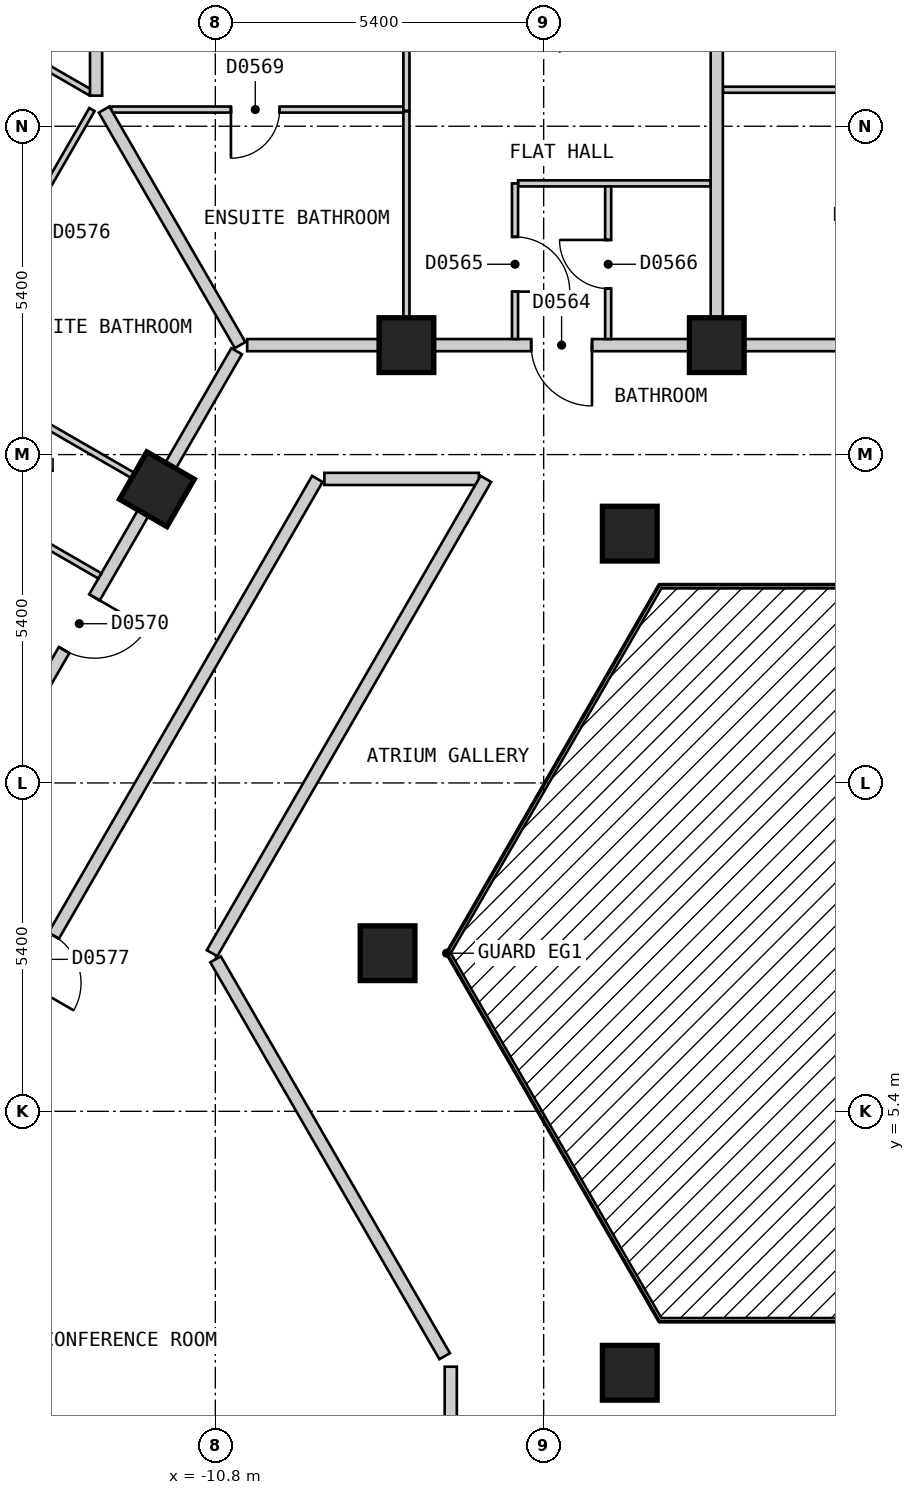
"""IFC4 building model, lengths in metres.
Left out: names, types, materials, properties, quantities, classifications, styles, units other than length and angle.
Written with IfcOpenShell. Run it as: python <this file> out.ifc"""

import sys

from ifc_helpers import new_model, si_unit, direction, frame, frame_2d, origin, origin_2d, place, context, subcontext, project, spatial, rectangle, extrude, element, fill, save


model = new_model("IFC4")
c1 = context("Model", 3, precision=1e-05, world=origin(), true_north=direction((0.0, 1.0)))
c2 = subcontext(c1, "Body", "Model", "MODEL_VIEW")
j1 = project(units=[si_unit("LENGTHUNIT", "METRE"), si_unit("PLANEANGLEUNIT", "RADIAN")], contexts=[c1])
p1 = place(None, origin())
s1 = spatial("IfcSite", under=j1, at=p1, CompositionType="ELEMENT")
p2 = place(p1, origin())
s2 = spatial("IfcBuilding", under=s1, at=p2, CompositionType="ELEMENT")
p3 = place(p2, frame((0.0, 0.0, 44.4)))
s3 = spatial("IfcBuildingStorey", under=s2, at=p3, CompositionType="ELEMENT", Elevation=44.4)
for number, where, z_axis, x_axis in (
    (1, (-2.553, 18.0, 0.0), (0.0, 0.0, 1.0), (-1.0, 0.0, 0.0)),
    (2, (-3.984, 14.9, 0.0), (0.0, 0.0, 1.0), (1.0, 0.0, 0.0)),
    (3, (-7.657, 18.0, 0.0), (0.0, 0.0, 1.0), (-1.0, 0.0, 0.0)),
    (4, (-11.761, 15.63, 0.0), (0.0, 0.0, 1.0), (-0.5, -0.866, 0.0)),
    (5, (-7.967, 8.0, 0.0), (0.0, 0.0, 1.0), (1.0, 0.0, 0.0)),
    (6, (-3.984, 1.1, 0.0), (0.0, 0.0, 1.0), (1.0, 0.0, 0.0)),
):
    element("IfcColumn", number, at=place(p3, frame(where, z_axis=z_axis, x_axis=x_axis)), inside=s3, PredefinedType="COLUMN", context=c2, shape_type="SweptSolid", body=[
        extrude(rectangle(XDim=0.9, YDim=0.9, at=origin_2d()), origin(), (0.0, 0.0, 1.0), 3.0),
    ])
p4 = place(p3, frame((-10.796, 7.9, 0.0), z_axis=(0.0, 0.0, 1.0), x_axis=(0.499954271211, -0.866051803703, 0.0)))
e7 = element("IfcWall", 7, at=p4, inside=s3, PredefinedType="PARTITIONING", context=c2, shape_type="SweptSolid", body=[
    extrude(rectangle(XDim=7.536, YDim=0.2, at=frame_2d((3.768, 0.0))), origin(), (0.0, 0.0, 1.0), 2.7),
])
p5 = place(p3, frame((-9.006, 15.8, 0.0), z_axis=(0.0, 0.0, 1.0), x_axis=(1.0, 0.0, 0.0)))
e8 = element("IfcWall", 8, at=p5, inside=s3, PredefinedType="PARTITIONING", context=c2, shape_type="SweptSolid", body=[
    extrude(rectangle(XDim=2.54, YDim=0.2, at=frame_2d((1.27, 0.0))), origin(), (0.0, 0.0, 1.0), 2.7),
])
p6 = place(p3, frame((-10.276, 18.0, 0.0), z_axis=(0.0, 0.0, 1.0), x_axis=(1.0, 0.0, 0.0)))
e9 = element("IfcWall", 9, at=p6, inside=s3, PredefinedType="PARTITIONING", context=c2, shape_type="SweptSolid", body=[
    extrude(rectangle(XDim=20.553, YDim=0.2, at=frame_2d((10.276, 0.0))), origin(), (0.0, 0.0, 1.0), 2.7),
])
p7 = place(p6, frame((14.879, 0.0, 0.0)))
e10 = element("IfcOpeningElement", 10, at=p7, cuts=e9, PredefinedType="OPENING", context=c2, shape_type="SweptSolid", body=[
    extrude(rectangle(XDim=1.0, YDim=2.1, at=frame_2d((0.5, 1.05))), frame((0.0, 0.11, 0.0), z_axis=(0.0, -1.0, 0.0), x_axis=(1.0, 0.0, 0.0)), (0.0, 0.0, 1.0), 0.22),
])
p8 = place(p6, frame((4.671, 0.0, 0.0)))
e11 = element("IfcOpeningElement", 11, at=p8, cuts=e9, PredefinedType="OPENING", context=c2, shape_type="SweptSolid", body=[
    extrude(rectangle(XDim=1.0, YDim=2.1, at=frame_2d((0.5, 1.05))), frame((0.0, 0.11, 0.0), z_axis=(0.0, -1.0, 0.0), x_axis=(1.0, 0.0, 0.0)), (0.0, 0.0, 1.0), 0.22),
])
p9 = place(p3, frame((-10.854, 8.0, 0.0), z_axis=(0.0, 0.0, 1.0), x_axis=(0.499964141897, 0.86604610548, 0.0)))
e12 = element("IfcWall", 12, at=p9, inside=s3, PredefinedType="PARTITIONING", context=c2, shape_type="SweptSolid", body=[
    extrude(rectangle(XDim=9.007, YDim=0.2, at=frame_2d((4.503, 0.0))), origin(), (0.0, 0.0, 1.0), 2.7),
])
p10 = place(p3, frame((-18.244, -0.001, 0.0), z_axis=(0.0, 0.0, 1.0), x_axis=(0.499962999376, 0.866046765051, 0.0)))
e13 = element("IfcWall", 13, at=p10, inside=s3, PredefinedType="PARTITIONING", context=c2, shape_type="SweptSolid", body=[
    extrude(rectangle(XDim=18.245, YDim=0.2, at=frame_2d((9.123, 0.0))), origin(), (0.0, 0.0, 1.0), 2.7),
])
p11 = place(p10, frame((8.672, 0.0, 0.0)))
e14 = element("IfcOpeningElement", 14, at=p11, cuts=e13, PredefinedType="OPENING", context=c2, shape_type="SweptSolid", body=[
    extrude(rectangle(XDim=0.9, YDim=2.1, at=frame_2d((0.45, 1.05))), frame((0.0, 0.11, 0.0), z_axis=(0.0, -1.0, 0.0), x_axis=(1.0, 0.0, 0.0)), (0.0, 0.0, 1.0), 0.22),
])
p12 = place(p3, frame((-20.727, 0.099, 0.0), z_axis=(0.0, 0.0, 1.0), x_axis=(0.499993204491, 0.866029327138, 0.0)))
e15 = element("IfcWall", 15, at=p12, inside=s3, PredefinedType="PARTITIONING", context=c2, shape_type="SweptSolid", body=[
    extrude(rectangle(XDim=20.554, YDim=0.2, at=frame_2d((10.277, 0.0))), origin(), (0.0, 0.0, 1.0), 2.7),
])
p13 = place(p12, frame((9.776, 0.0, 0.0)))
e16 = element("IfcOpeningElement", 16, at=p13, cuts=e15, PredefinedType="OPENING", context=c2, shape_type="SweptSolid", body=[
    extrude(rectangle(XDim=1.0, YDim=2.1, at=frame_2d((0.5, 1.05))), frame((0.0, 0.11, 0.0), z_axis=(0.0, -1.0, 0.0), x_axis=(1.0, 0.0, 0.0)), (0.0, 0.0, 1.0), 0.22),
])
p14 = place(p12, frame((4.673, 0.0, 0.0)))
e17 = element("IfcOpeningElement", 17, at=p14, cuts=e15, PredefinedType="OPENING", context=c2, shape_type="SweptSolid", body=[
    extrude(rectangle(XDim=1.0, YDim=2.1, at=frame_2d((0.5, 1.05))), frame((0.0, 0.11, 0.0), z_axis=(0.0, -1.0, 0.0), x_axis=(1.0, 0.0, 0.0)), (0.0, 0.0, 1.0), 0.22),
])
p15 = place(p12, frame((14.88, 0.0, 0.0)))
e18 = element("IfcOpeningElement", 18, at=p15, cuts=e15, PredefinedType="OPENING", context=c2, shape_type="SweptSolid", body=[
    extrude(rectangle(XDim=1.0, YDim=2.1, at=frame_2d((0.5, 1.05))), frame((0.0, 0.11, 0.0), z_axis=(0.0, -1.0, 0.0), x_axis=(1.0, 0.0, 0.0)), (0.0, 0.0, 1.0), 0.22),
])
p16 = place(p3, frame((-6.928, -2.8, 0.0), z_axis=(0.0, 0.0, 1.0), x_axis=(0.0, 1.0, 0.0)))
e19 = element("IfcWall", 19, at=p16, inside=s3, PredefinedType="PARTITIONING", context=c2, shape_type="SweptSolid", body=[
    extrude(rectangle(XDim=4.0, YDim=0.2, at=frame_2d((2.0, 0.0))), origin(), (0.0, 0.0, 1.0), 2.7),
])
p17 = place(p3, frame((-7.657, 21.844, 0.0), z_axis=(0.0, 0.0, 1.0), x_axis=(0.0, -1.0, 0.0)))
e20 = element("IfcWall", 20, at=p17, inside=s3, PredefinedType="PARTITIONING", context=c2, shape_type="SweptSolid", body=[
    extrude(rectangle(XDim=3.744, YDim=0.1, at=frame_2d((1.872, 0.0))), origin(), (0.0, 0.0, 1.0), 2.7),
])
p18 = place(p3, frame((-16.073, 16.154, 0.0), z_axis=(0.0, 0.0, 1.0), x_axis=(0.865979019114, -0.500080332001, 0.0)))
e21 = element("IfcWall", 21, at=p18, inside=s3, PredefinedType="PARTITIONING", context=c2, shape_type="SweptSolid", body=[
    extrude(rectangle(XDim=3.897, YDim=0.1, at=frame_2d((1.949, 0.0))), origin(), (0.0, 0.0, 1.0), 2.7),
])
p19 = place(p18, frame((1.524, 0.0, 0.0)))
e22 = element("IfcOpeningElement", 22, at=p19, cuts=e21, PredefinedType="OPENING", context=c2, shape_type="SweptSolid", body=[
    extrude(rectangle(XDim=0.9, YDim=2.1, at=frame_2d((0.45, 1.05))), frame((0.0, 0.06, 0.0), z_axis=(0.0, -1.0, 0.0), x_axis=(1.0, 0.0, 0.0)), (0.0, 0.0, 1.0), 0.12),
])
p20 = place(p3, frame((-20.508, 20.679, 0.0), z_axis=(0.0, 0.0, 1.0), x_axis=(0.866047370643, -0.499961950354, 0.0)))
e23 = element("IfcWall", 23, at=p20, inside=s3, PredefinedType="PARTITIONING", context=c2, shape_type="SweptSolid", body=[
    extrude(rectangle(XDim=10.001, YDim=0.1, at=frame_2d((5.0, 0.0))), origin(), (0.0, 0.0, 1.0), 2.7),
])
p21 = place(p20, frame((2.576, 0.0, 0.0)))
e24 = element("IfcOpeningElement", 24, at=p21, cuts=e23, PredefinedType="OPENING", context=c2, shape_type="SweptSolid", body=[
    extrude(rectangle(XDim=0.9, YDim=2.1, at=frame_2d((0.45, 1.05))), frame((0.0, 0.06, 0.0), z_axis=(0.0, -1.0, 0.0), x_axis=(1.0, 0.0, 0.0)), (0.0, 0.0, 1.0), 0.12),
])
p22 = place(p3, frame((-17.955, 25.099, 0.0), z_axis=(0.0, 0.0, 1.0), x_axis=(0.866036353684, -0.499981033738, 0.0)))
e25 = element("IfcWall", 25, at=p22, inside=s3, PredefinedType="PARTITIONING", context=c2, shape_type="SweptSolid", body=[
    extrude(rectangle(XDim=5.885, YDim=0.1, at=frame_2d((2.942, 0.0))), origin(), (0.0, 0.0, 1.0), 2.7),
])
p23 = place(p22, frame((2.55, 0.0, 0.0)))
e26 = element("IfcOpeningElement", 26, at=p23, cuts=e25, PredefinedType="OPENING", context=c2, shape_type="SweptSolid", body=[
    extrude(rectangle(XDim=0.9, YDim=2.1, at=frame_2d((0.45, 1.05))), frame((0.0, 0.06, 0.0), z_axis=(0.0, -1.0, 0.0), x_axis=(1.0, 0.0, 0.0)), (0.0, 0.0, 1.0), 0.12),
])
p24 = place(p3, frame((-5.82, 20.66, 0.0), z_axis=(0.0, 0.0, 1.0), x_axis=(1.0, 0.0, 0.0)))
e27 = element("IfcWall", 27, at=p24, inside=s3, PredefinedType="PARTITIONING", context=c2, shape_type="SweptSolid", body=[
    extrude(rectangle(XDim=3.167, YDim=0.1, at=frame_2d((1.583, 0.0))), origin(), (0.0, 0.0, 1.0), 2.7),
])
p25 = place(p3, frame((-12.513, 21.874, 0.0), z_axis=(0.0, 0.0, 1.0), x_axis=(1.0, 0.0, 0.0)))
e28 = element("IfcWall", 28, at=p25, inside=s3, PredefinedType="PARTITIONING", context=c2, shape_type="SweptSolid", body=[
    extrude(rectangle(XDim=4.806, YDim=0.1, at=frame_2d((2.403, 0.0))), origin(), (0.0, 0.0, 1.0), 2.7),
])
p26 = place(p25, frame((1.97, 0.0, 0.0)))
e29 = element("IfcOpeningElement", 29, at=p26, cuts=e28, PredefinedType="OPENING", context=c2, shape_type="SweptSolid", body=[
    extrude(rectangle(XDim=0.8, YDim=2.1, at=frame_2d((0.4, 1.05))), frame((0.0, 0.06, 0.0), z_axis=(0.0, -1.0, 0.0), x_axis=(1.0, 0.0, 0.0)), (0.0, 0.0, 1.0), 0.12),
])
p27 = place(p3, frame((-2.453, 22.2, 0.0), z_axis=(0.0, 0.0, 1.0), x_axis=(1.0, 0.0, 0.0)))
e30 = element("IfcWall", 30, at=p27, inside=s3, PredefinedType="PARTITIONING", context=c2, shape_type="SweptSolid", body=[
    extrude(rectangle(XDim=15.155, YDim=0.1, at=frame_2d((7.577, 0.0))), origin(), (0.0, 0.0, 1.0), 2.7),
])
p28 = place(p27, frame((7.106, 0.0, 0.0)))
e31 = element("IfcOpeningElement", 31, at=p28, cuts=e30, PredefinedType="OPENING", context=c2, shape_type="SweptSolid", body=[
    extrude(rectangle(XDim=0.9, YDim=2.1, at=frame_2d((0.45, 1.05))), frame((0.0, 0.06, 0.0), z_axis=(0.0, -1.0, 0.0), x_axis=(1.0, 0.0, 0.0)), (0.0, 0.0, 1.0), 0.12),
])
p29 = place(p3, frame((-4.339, 18.1, 0.0), z_axis=(0.0, 0.0, 1.0), x_axis=(0.0, 1.0, 0.0)))
e32 = element("IfcWall", 32, at=p29, inside=s3, PredefinedType="PARTITIONING", context=c2, shape_type="SweptSolid", body=[
    extrude(rectangle(XDim=2.51, YDim=0.1, at=frame_2d((1.255, 0.0))), origin(), (0.0, 0.0, 1.0), 2.7),
])
p30 = place(p29, frame((0.83, 0.0, 0.0)))
e33 = element("IfcOpeningElement", 33, at=p30, cuts=e32, PredefinedType="OPENING", context=c2, shape_type="SweptSolid", body=[
    extrude(rectangle(XDim=0.8, YDim=2.1, at=frame_2d((0.4, 1.05))), frame((0.0, 0.06, 0.0), z_axis=(0.0, -1.0, 0.0), x_axis=(1.0, 0.0, 0.0)), (0.0, 0.0, 1.0), 0.12),
])
p31 = place(p3, frame((-5.871, 18.1, 0.0), z_axis=(0.0, 0.0, 1.0), x_axis=(0.0, 1.0, 0.0)))
e34 = element("IfcWall", 34, at=p31, inside=s3, PredefinedType="PARTITIONING", context=c2, shape_type="SweptSolid", body=[
    extrude(rectangle(XDim=2.559, YDim=0.1, at=frame_2d((1.279, 0.0))), origin(), (0.0, 0.0, 1.0), 2.7),
])
p32 = place(p31, frame((0.78, 0.0, 0.0)))
e35 = element("IfcOpeningElement", 35, at=p32, cuts=e34, PredefinedType="OPENING", context=c2, shape_type="SweptSolid", body=[
    extrude(rectangle(XDim=0.9, YDim=2.1, at=frame_2d((0.45, 1.05))), frame((0.0, 0.06, 0.0), z_axis=(0.0, -1.0, 0.0), x_axis=(1.0, 0.0, 0.0)), (0.0, 0.0, 1.0), 0.12),
])
p33 = place(p3, frame((-7.657, 21.854, 0.0), z_axis=(0.0, 0.0, 1.0), x_axis=(0.0, 1.0, 0.0)))
e36 = element("IfcWall", 36, at=p33, inside=s3, PredefinedType="PARTITIONING", context=c2, shape_type="SweptSolid", body=[
    extrude(rectangle(XDim=3.216, YDim=0.1, at=frame_2d((1.608, 0.0))), origin(), (0.0, 0.0, 1.0), 2.7),
])
p34 = place(p33, frame((1.158, 0.0, 0.0)))
e37 = element("IfcOpeningElement", 37, at=p34, cuts=e36, PredefinedType="OPENING", context=c2, shape_type="SweptSolid", body=[
    extrude(rectangle(XDim=0.9, YDim=2.1, at=frame_2d((0.45, 1.05))), frame((0.0, 0.06, 0.0), z_axis=(0.0, -1.0, 0.0), x_axis=(1.0, 0.0, 0.0)), (0.0, 0.0, 1.0), 0.12),
])
p35 = place(p3, frame((-12.629, 21.874, 0.0), z_axis=(0.0, 0.0, 1.0), x_axis=(0.500024801635, -0.86601108408, 0.0)))
e38 = element("IfcWall", 38, at=p35, inside=s3, PredefinedType="PARTITIONING", context=c2, shape_type="SweptSolid", body=[
    extrude(rectangle(XDim=4.473, YDim=0.2, at=frame_2d((2.237, 0.0))), origin(), (0.0, 0.0, 1.0), 2.7),
])
p36 = place(p3, frame((-12.761, 22.103, 0.0), z_axis=(0.0, 0.0, 1.0), x_axis=(0.0, 1.0, 0.0)))
e39 = element("IfcWall", 39, at=p36, inside=s3, PredefinedType="PARTITIONING", context=c2, shape_type="SweptSolid", body=[
    extrude(rectangle(XDim=5.997, YDim=0.2, at=frame_2d((2.999, 0.0))), origin(), (0.0, 0.0, 1.0), 2.7),
])
p37 = place(p3, frame((-2.553, 18.1, 0.0), z_axis=(0.0, 0.0, 1.0), x_axis=(0.0, 1.0, 0.0)))
e40 = element("IfcWall", 40, at=p37, inside=s3, PredefinedType="PARTITIONING", context=c2, shape_type="SweptSolid", body=[
    extrude(rectangle(XDim=10.0, YDim=0.2, at=frame_2d((5.0, 0.0))), origin(), (0.0, 0.0, 1.0), 2.7),
])
p38 = place(p3, frame((-15.266, 17.653, 0.0), z_axis=(0.0, 0.0, 1.0), x_axis=(0.500007182864, 0.866021256716, 0.0)))
e41 = element("IfcWall", 41, at=p38, inside=s3, PredefinedType="PARTITIONING", context=c2, shape_type="SweptSolid", body=[
    extrude(rectangle(XDim=4.874, YDim=0.1, at=frame_2d((2.437, 0.0))), origin(), (0.0, 0.0, 1.0), 2.7),
])
p39 = place(p38, frame((2.137, 0.0, 0.0)))
e42 = element("IfcOpeningElement", 42, at=p39, cuts=e41, PredefinedType="OPENING", context=c2, shape_type="SweptSolid", body=[
    extrude(rectangle(XDim=0.8, YDim=2.1, at=frame_2d((0.4, 1.05))), frame((0.0, 0.06, 0.0), z_axis=(0.0, -1.0, 0.0), x_axis=(1.0, 0.0, 0.0)), (0.0, 0.0, 1.0), 0.12),
])
p40 = place(p8, origin())
e43 = element("IfcDoor", 43, at=p40, inside=s3, OperationType="SINGLE_SWING_RIGHT", PredefinedType="DOOR", context=c2, shape_type="SweptSolid", body=[
    extrude(rectangle(XDim=1.0, YDim=2.1, at=frame_2d((0.5, 1.05))), frame((0.0, 0.025, 0.0), z_axis=(0.0, -1.0, 0.0), x_axis=(1.0, 0.0, 0.0)), (0.0, 0.0, 1.0), 0.05),
])
fill(e11, e43)
p41 = place(p32, origin())
e44 = element("IfcDoor", 44, at=p41, inside=s3, OperationType="SINGLE_SWING_LEFT", PredefinedType="DOOR", context=c2, shape_type="SweptSolid", body=[
    extrude(rectangle(XDim=0.9, YDim=2.1, at=frame_2d((0.45, 1.05))), frame((0.0, 0.025, 0.0), z_axis=(0.0, -1.0, 0.0), x_axis=(1.0, 0.0, 0.0)), (0.0, 0.0, 1.0), 0.05),
])
fill(e35, e44)
p42 = place(p30, origin())
e45 = element("IfcDoor", 45, at=p42, inside=s3, OperationType="SINGLE_SWING_RIGHT", PredefinedType="DOOR", context=c2, shape_type="SweptSolid", body=[
    extrude(rectangle(XDim=0.8, YDim=2.1, at=frame_2d((0.4, 1.05))), frame((0.0, 0.025, 0.0), z_axis=(0.0, -1.0, 0.0), x_axis=(1.0, 0.0, 0.0)), (0.0, 0.0, 1.0), 0.05),
])
fill(e33, e45)
p43 = place(p26, origin())
e46 = element("IfcDoor", 46, at=p43, inside=s3, OperationType="SINGLE_SWING_LEFT", PredefinedType="DOOR", context=c2, shape_type="SweptSolid", body=[
    extrude(rectangle(XDim=0.8, YDim=2.1, at=frame_2d((0.4, 1.05))), frame((0.0, 0.025, 0.0), z_axis=(0.0, -1.0, 0.0), x_axis=(1.0, 0.0, 0.0)), (0.0, 0.0, 1.0), 0.05),
])
fill(e29, e46)
p44 = place(p15, origin())
e47 = element("IfcDoor", 47, at=p44, inside=s3, OperationType="SINGLE_SWING_RIGHT", PredefinedType="DOOR", context=c2, shape_type="SweptSolid", body=[
    extrude(rectangle(XDim=1.0, YDim=2.1, at=frame_2d((0.5, 1.05))), frame((0.0, 0.025, 0.0), z_axis=(0.0, -1.0, 0.0), x_axis=(1.0, 0.0, 0.0)), (0.0, 0.0, 1.0), 0.05),
])
fill(e18, e47)
p45 = place(p11, origin())
e48 = element("IfcDoor", 48, at=p45, inside=s3, OperationType="SINGLE_SWING_LEFT", PredefinedType="DOOR", context=c2, shape_type="SweptSolid", body=[
    extrude(rectangle(XDim=0.9, YDim=2.1, at=frame_2d((0.45, 1.05))), frame((0.0, 0.025, 0.0), z_axis=(0.0, -1.0, 0.0), x_axis=(1.0, 0.0, 0.0)), (0.0, 0.0, 1.0), 0.05),
])
fill(e14, e48)
save(model, sys.argv[1])
